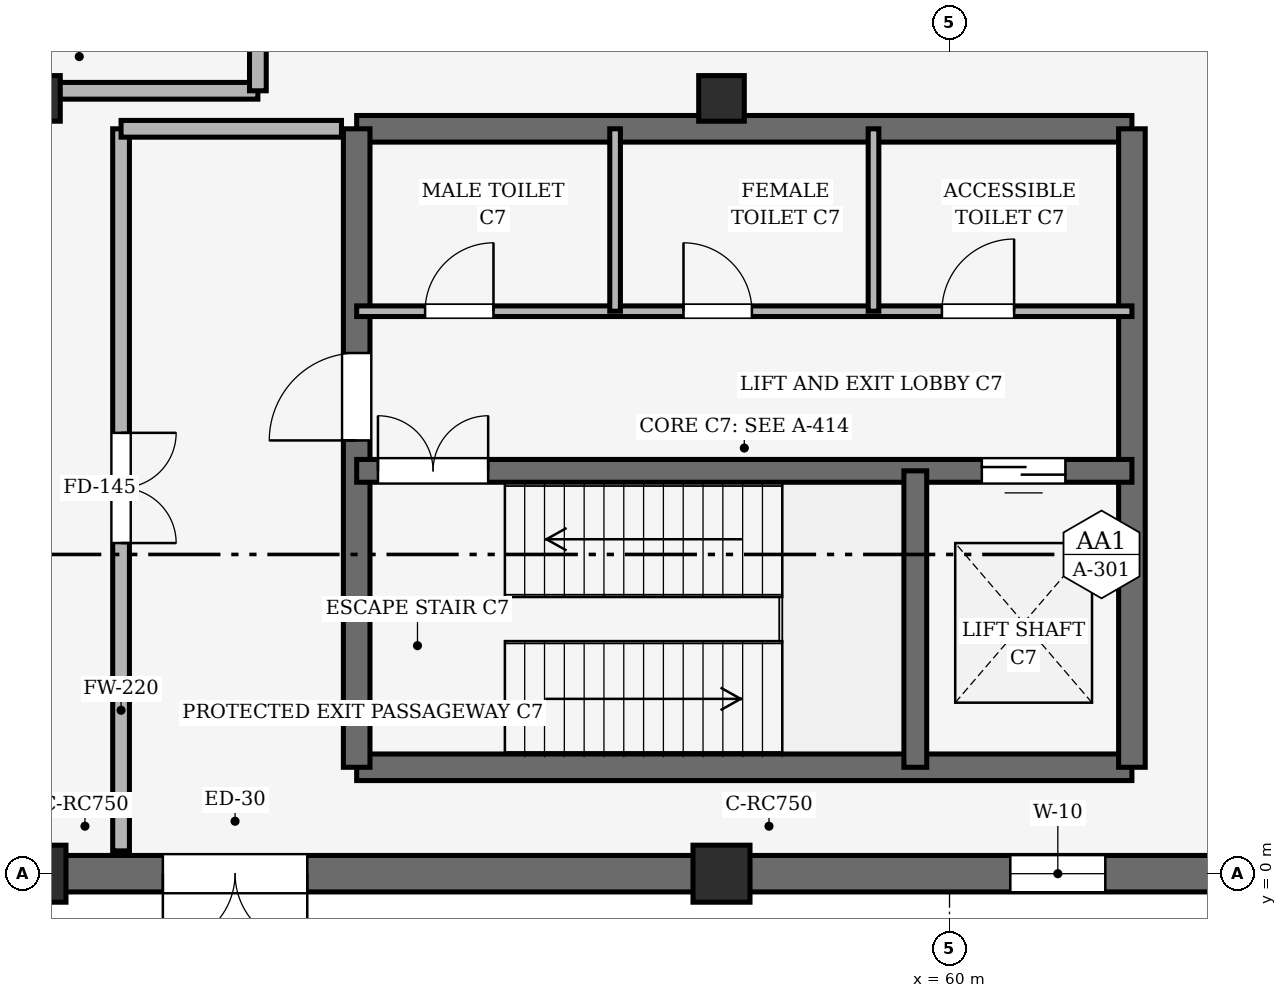
"""IFC4 building model, lengths in metres.
Left out: names, types, materials, properties, quantities, classifications, styles, units other than length and angle.
Written with IfcOpenShell. Run it as: python <this file> out.ifc"""

import sys

from ifc_helpers import new_model, si_unit, direction, frame, frame_2d, origin, origin_2d, place, context, subcontext, project, spatial, rectangle, extrude, element, fill, save


model = new_model("IFC4")
c1 = context("Model", 3, precision=1e-05, world=origin(), true_north=direction((0.0, 1.0)))
c2 = subcontext(c1, "Body", "Model", "MODEL_VIEW")
j1 = project(units=[si_unit("LENGTHUNIT", "METRE"), si_unit("PLANEANGLEUNIT", "RADIAN")], contexts=[c1])
p1 = place(None, origin())
s1 = spatial("IfcSite", under=j1, at=p1, CompositionType="ELEMENT")
p2 = place(p1, origin())
s2 = spatial("IfcBuilding", under=s1, at=p2, CompositionType="ELEMENT")
p3 = place(p2, origin())
s3 = spatial("IfcBuildingStorey", under=s2, at=p3, CompositionType="ELEMENT", Elevation=0.0)
p4 = place(p3, frame((48.0, 0.0, -0.44), z_axis=(0.0, 0.0, 1.0), x_axis=(1.0, 0.0, 0.0)))
e1 = element("IfcColumn", 1, at=p4, inside=s3, PredefinedType="COLUMN", context=c2, shape_type="SweptSolid", body=[
    extrude(rectangle(XDim=0.75, YDim=0.75, at=origin_2d()), origin(), (0.0, 0.0, 1.0), 5.84),
])
p5 = place(p3, frame((48.0, 10.2, -0.44), z_axis=(0.0, 0.0, 1.0), x_axis=(1.0, 0.0, 0.0)))
e2 = element("IfcColumn", 2, at=p5, inside=s3, PredefinedType="COLUMN", context=c2, shape_type="SweptSolid", body=[
    extrude(rectangle(XDim=0.6, YDim=0.6, at=origin_2d()), origin(), (0.0, 0.0, 1.0), 5.84),
])
p6 = place(p3, frame((57.0, 0.0, -0.44), z_axis=(0.0, 0.0, 1.0), x_axis=(1.0, 0.0, 0.0)))
e3 = element("IfcColumn", 3, at=p6, inside=s3, PredefinedType="COLUMN", context=c2, shape_type="SweptSolid", body=[
    extrude(rectangle(XDim=0.75, YDim=0.75, at=origin_2d()), origin(), (0.0, 0.0, 1.0), 5.84),
])
p7 = place(p3, frame((57.0, 10.2, -0.44), z_axis=(0.0, 0.0, 1.0), x_axis=(1.0, 0.0, 0.0)))
e4 = element("IfcColumn", 4, at=p7, inside=s3, PredefinedType="COLUMN", context=c2, shape_type="SweptSolid", body=[
    extrude(rectangle(XDim=0.6, YDim=0.6, at=origin_2d()), origin(), (0.0, 0.0, 1.0), 5.84),
])
p8 = place(p3, frame((48.0, 0.0, 0.0), z_axis=(0.0, 0.0, 1.0), x_axis=(1.0, 0.0, 0.0)))
e5 = element("IfcWall", 5, at=p8, inside=s3, PredefinedType="SOLIDWALL", context=c2, shape_type="SweptSolid", body=[
    extrude(rectangle(XDim=9.0, YDim=0.48, at=frame_2d((4.5, 0.0))), origin(), (0.0, 0.0, 1.0), 4.65),
])
p9 = place(p8, frame((1.65, 0.0, 0.0)))
e6 = element("IfcOpeningElement", 6, at=p9, cuts=e5, PredefinedType="OPENING", context=c2, shape_type="SweptSolid", body=[
    extrude(rectangle(XDim=1.9, YDim=2.35, at=frame_2d((0.95, 1.175))), frame((0.0, 0.25, 0.0), z_axis=(0.0, -1.0, 0.0), x_axis=(1.0, 0.0, 0.0)), (0.0, 0.0, 1.0), 0.5),
])
p10 = place(p3, frame((57.0, 0.0, 0.0), z_axis=(0.0, 0.0, 1.0), x_axis=(1.0, 0.0, 0.0)))
e7 = element("IfcWall", 7, at=p10, inside=s3, PredefinedType="SOLIDWALL", context=c2, shape_type="SweptSolid", body=[
    extrude(rectangle(XDim=9.0, YDim=0.48, at=frame_2d((4.5, 0.0))), origin(), (0.0, 0.0, 1.0), 4.65),
])
p11 = place(p10, frame((3.8, 0.0, 1.3)))
e8 = element("IfcOpeningElement", 8, at=p11, cuts=e7, PredefinedType="OPENING", context=c2, shape_type="SweptSolid", body=[
    extrude(rectangle(XDim=1.25, YDim=1.85, at=frame_2d((0.625, 0.925))), frame((0.0, 0.25, 0.0), z_axis=(0.0, -1.0, 0.0), x_axis=(1.0, 0.0, 0.0)), (0.0, 0.0, 1.0), 0.5),
])
for number, where, z_axis, x_axis in (
    (9, (52.2, 1.4, 0.0), (0.0, 0.0, 1.0), (1.0, 0.0, 0.0)),
    (10, (62.4, 9.8, 0.0), (0.0, 0.0, 1.0), (-1.0, 0.0, 0.0)),
):
    element("IfcWall", number, at=place(p3, frame(where, z_axis=z_axis, x_axis=x_axis)), inside=s3, PredefinedType="SHEAR", context=c2, shape_type="SweptSolid", body=[
        extrude(rectangle(XDim=10.2, YDim=0.35, at=frame_2d((5.1, 0.0))), origin(), (0.0, 0.0, 1.0), 5.4),
    ])
p12 = place(p3, frame((52.2, 9.8, 0.0), z_axis=(0.0, 0.0, 1.0), x_axis=(0.0, -1.0, 0.0)))
e11 = element("IfcWall", 11, at=p12, inside=s3, PredefinedType="SHEAR", context=c2, shape_type="SweptSolid", body=[
    extrude(rectangle(XDim=8.4, YDim=0.35, at=frame_2d((4.2, 0.0))), origin(), (0.0, 0.0, 1.0), 5.4),
])
p13 = place(p12, frame((2.95, 0.0, 0.0)))
e12 = element("IfcOpeningElement", 12, at=p13, cuts=e11, PredefinedType="OPENING", context=c2, shape_type="SweptSolid", body=[
    extrude(rectangle(XDim=1.15, YDim=2.15, at=frame_2d((0.575, 1.075))), frame((0.0, 0.185, 0.0), z_axis=(0.0, -1.0, 0.0), x_axis=(1.0, 0.0, 0.0)), (0.0, 0.0, 1.0), 0.37),
])
p14 = place(p3, frame((62.4, 1.4, 0.0), z_axis=(0.0, 0.0, 1.0), x_axis=(0.0, 1.0, 0.0)))
e13 = element("IfcWall", 13, at=p14, inside=s3, PredefinedType="SHEAR", context=c2, shape_type="SweptSolid", body=[
    extrude(rectangle(XDim=8.4, YDim=0.35, at=frame_2d((4.2, 0.0))), origin(), (0.0, 0.0, 1.0), 5.4),
])
p15 = place(p3, frame((52.2, 5.3, 0.0), z_axis=(0.0, 0.0, 1.0), x_axis=(1.0, 0.0, 0.0)))
e14 = element("IfcWall", 14, at=p15, inside=s3, PredefinedType="SHEAR", context=c2, shape_type="SweptSolid", body=[
    extrude(rectangle(XDim=10.2, YDim=0.3, at=frame_2d((5.1, 0.0))), origin(), (0.0, 0.0, 1.0), 5.4),
])
p16 = place(p15, frame((0.28, 0.0, 0.0)))
e15 = element("IfcOpeningElement", 15, at=p16, cuts=e14, PredefinedType="OPENING", context=c2, shape_type="SweptSolid", body=[
    extrude(rectangle(XDim=1.45, YDim=2.15, at=frame_2d((0.725, 1.075))), frame((0.0, 0.16, 0.0), z_axis=(0.0, -1.0, 0.0), x_axis=(1.0, 0.0, 0.0)), (0.0, 0.0, 1.0), 0.32),
])
p17 = place(p15, frame((8.225, 0.0, 0.0)))
e16 = element("IfcOpeningElement", 16, at=p17, cuts=e14, PredefinedType="OPENING", context=c2, shape_type="SweptSolid", body=[
    extrude(rectangle(XDim=1.1, YDim=2.15, at=frame_2d((0.55, 1.075))), frame((0.0, 0.16, 0.0), z_axis=(0.0, -1.0, 0.0), x_axis=(1.0, 0.0, 0.0)), (0.0, 0.0, 1.0), 0.32),
])
p18 = place(p3, frame((59.55, 1.4, 0.0), z_axis=(0.0, 0.0, 1.0), x_axis=(0.0, 1.0, 0.0)))
e17 = element("IfcWall", 17, at=p18, inside=s3, PredefinedType="SHEAR", context=c2, shape_type="SweptSolid", body=[
    extrude(rectangle(XDim=3.9, YDim=0.3, at=frame_2d((1.95, 0.0))), origin(), (0.0, 0.0, 1.0), 5.4),
])
p19 = place(p3, frame((52.2, 7.4, 0.0), z_axis=(0.0, 0.0, 1.0), x_axis=(1.0, 0.0, 0.0)))
e18 = element("IfcWall", 18, at=p19, inside=s3, PredefinedType="PARTITIONING", context=c2, shape_type="SweptSolid", body=[
    extrude(rectangle(XDim=10.2, YDim=0.14, at=frame_2d((5.1, 0.0))), origin(), (0.0, 0.0, 1.0), 4.5),
])
p20 = place(p19, frame((0.9, 0.0, 0.0)))
e19 = element("IfcOpeningElement", 19, at=p20, cuts=e18, PredefinedType="OPENING", context=c2, shape_type="SweptSolid", body=[
    extrude(rectangle(XDim=0.9, YDim=2.1, at=frame_2d((0.45, 1.05))), frame((0.0, 0.08, 0.0), z_axis=(0.0, -1.0, 0.0), x_axis=(1.0, 0.0, 0.0)), (0.0, 0.0, 1.0), 0.16),
])
p21 = place(p19, frame((4.3, 0.0, 0.0)))
e20 = element("IfcOpeningElement", 20, at=p21, cuts=e18, PredefinedType="OPENING", context=c2, shape_type="SweptSolid", body=[
    extrude(rectangle(XDim=0.9, YDim=2.1, at=frame_2d((0.45, 1.05))), frame((0.0, 0.08, 0.0), z_axis=(0.0, -1.0, 0.0), x_axis=(1.0, 0.0, 0.0)), (0.0, 0.0, 1.0), 0.16),
])
p22 = place(p19, frame((7.7, 0.0, 0.0)))
e21 = element("IfcOpeningElement", 21, at=p22, cuts=e18, PredefinedType="OPENING", context=c2, shape_type="SweptSolid", body=[
    extrude(rectangle(XDim=0.95, YDim=2.1, at=frame_2d((0.475, 1.05))), frame((0.0, 0.08, 0.0), z_axis=(0.0, -1.0, 0.0), x_axis=(1.0, 0.0, 0.0)), (0.0, 0.0, 1.0), 0.16),
])
for number, where, z_axis, x_axis in (
    (22, (55.6, 7.4, 0.0), (0.0, 0.0, 1.0), (0.0, 1.0, 0.0)),
    (23, (59.0, 7.4, 0.0), (0.0, 0.0, 1.0), (0.0, 1.0, 0.0)),
):
    element("IfcWall", number, at=place(p3, frame(where, z_axis=z_axis, x_axis=x_axis)), inside=s3, PredefinedType="PARTITIONING", context=c2, shape_type="SweptSolid", body=[
        extrude(rectangle(XDim=2.4, YDim=0.14, at=frame_2d((1.2, 0.0))), origin(), (0.0, 0.0, 1.0), 4.5),
    ])
p23 = place(p3, frame((49.1, 9.8, 0.0), z_axis=(0.0, 0.0, 1.0), x_axis=(0.0, -1.0, 0.0)))
e24 = element("IfcWall", 24, at=p23, inside=s3, PredefinedType="SOLIDWALL", context=c2, shape_type="SweptSolid", body=[
    extrude(rectangle(XDim=9.5, YDim=0.22, at=frame_2d((4.75, 0.0))), origin(), (0.0, 0.0, 1.0), 4.6),
])
p24 = place(p23, frame((4.0, 0.0, 0.0)))
e25 = element("IfcOpeningElement", 25, at=p24, cuts=e24, PredefinedType="OPENING", context=c2, shape_type="SweptSolid", body=[
    extrude(rectangle(XDim=1.45, YDim=2.15, at=frame_2d((0.725, 1.075))), frame((0.0, 0.12, 0.0), z_axis=(0.0, -1.0, 0.0), x_axis=(1.0, 0.0, 0.0)), (0.0, 0.0, 1.0), 0.24),
])
p25 = place(p3, frame((49.1, 9.8, 0.0), z_axis=(0.0, 0.0, 1.0), x_axis=(1.0, 0.0, 0.0)))
e26 = element("IfcWall", 26, at=p25, inside=s3, PredefinedType="SOLIDWALL", context=c2, shape_type="SweptSolid", body=[
    extrude(rectangle(XDim=2.9, YDim=0.22, at=frame_2d((1.45, 0.0))), origin(), (0.0, 0.0, 1.0), 4.6),
])
p26 = place(p3, frame((15.1, 10.3, 0.0), z_axis=(0.0, 0.0, 1.0), x_axis=(1.0, 0.0, 0.0)))
e27 = element("IfcWall", 27, at=p26, inside=s3, PredefinedType="SOLIDWALL", context=c2, shape_type="SweptSolid", body=[
    extrude(rectangle(XDim=35.8, YDim=0.22, at=frame_2d((17.9, 0.0))), origin(), (0.0, 0.0, 1.0), 4.1),
])
p27 = place(p26, frame((9.4, 0.0, 0.0)))
e28 = element("IfcOpeningElement", 28, at=p27, cuts=e27, PredefinedType="OPENING", context=c2, shape_type="SweptSolid", body=[
    extrude(rectangle(XDim=2.05, YDim=2.3, at=frame_2d((1.025, 1.15))), frame((0.0, 0.12, 0.0), z_axis=(0.0, -1.0, 0.0), x_axis=(1.0, 0.0, 0.0)), (0.0, 0.0, 1.0), 0.24),
])
p28 = place(p26, frame((27.4, 0.0, 0.0)))
e29 = element("IfcOpeningElement", 29, at=p28, cuts=e27, PredefinedType="OPENING", context=c2, shape_type="SweptSolid", body=[
    extrude(rectangle(XDim=2.05, YDim=2.3, at=frame_2d((1.025, 1.15))), frame((0.0, 0.12, 0.0), z_axis=(0.0, -1.0, 0.0), x_axis=(1.0, 0.0, 0.0)), (0.0, 0.0, 1.0), 0.24),
])
p29 = place(p3, frame((50.9, 10.3, 0.0), z_axis=(0.0, 0.0, 1.0), x_axis=(0.0, 1.0, 0.0)))
e30 = element("IfcWall", 30, at=p29, inside=s3, PredefinedType="SOLIDWALL", context=c2, shape_type="SweptSolid", body=[
    extrude(rectangle(XDim=23.4, YDim=0.22, at=frame_2d((11.7, 0.0))), origin(), (0.0, 0.0, 1.0), 4.1),
])
p30 = place(p29, frame((10.5, 0.0, 0.0)))
e31 = element("IfcOpeningElement", 31, at=p30, cuts=e30, PredefinedType="OPENING", context=c2, shape_type="SweptSolid", body=[
    extrude(rectangle(XDim=2.05, YDim=2.3, at=frame_2d((1.025, 1.15))), frame((0.0, 0.12, 0.0), z_axis=(0.0, -1.0, 0.0), x_axis=(1.0, 0.0, 0.0)), (0.0, 0.0, 1.0), 0.24),
])
p31 = place(p11, origin())
e32 = element("IfcWindow", 32, at=p31, inside=s3, PartitioningType="SINGLE_PANEL", PredefinedType="WINDOW", context=c2, shape_type="SweptSolid", body=[
    extrude(rectangle(XDim=1.25, YDim=1.85, at=frame_2d((0.625, 0.925))), frame((0.0, 0.03, 0.0), z_axis=(0.0, -1.0, 0.0), x_axis=(1.0, 0.0, 0.0)), (0.0, 0.0, 1.0), 0.06),
])
fill(e8, e32)
p32 = place(p9, frame((1.9, 0.0, 0.0), z_axis=(0.0, 0.0, 1.0), x_axis=(-1.0, 0.0, 0.0)))
e33 = element("IfcDoor", 33, at=p32, inside=s3, OperationType="DOUBLE_DOOR_SINGLE_SWING", PredefinedType="DOOR", context=c2, shape_type="SweptSolid", body=[
    extrude(rectangle(XDim=1.9, YDim=2.35, at=frame_2d((0.95, 1.175))), frame((0.0, 0.025, 0.0), z_axis=(0.0, -1.0, 0.0), x_axis=(1.0, 0.0, 0.0)), (0.0, 0.0, 1.0), 0.05),
])
fill(e6, e33)
p33 = place(p13, frame((1.15, 0.0, 0.0), z_axis=(0.0, 0.0, 1.0), x_axis=(-1.0, 0.0, 0.0)))
e34 = element("IfcDoor", 34, at=p33, inside=s3, OperationType="SINGLE_SWING_LEFT", PredefinedType="DOOR", context=c2, shape_type="SweptSolid", body=[
    extrude(rectangle(XDim=1.15, YDim=2.15, at=frame_2d((0.575, 1.075))), frame((0.0, 0.025, 0.0), z_axis=(0.0, -1.0, 0.0), x_axis=(1.0, 0.0, 0.0)), (0.0, 0.0, 1.0), 0.05),
])
fill(e12, e34)
p34 = place(p16, origin())
e35 = element("IfcDoor", 35, at=p34, inside=s3, OperationType="DOUBLE_DOOR_SINGLE_SWING", PredefinedType="DOOR", context=c2, shape_type="SweptSolid", body=[
    extrude(rectangle(XDim=1.45, YDim=2.15, at=frame_2d((0.725, 1.075))), frame((0.0, 0.025, 0.0), z_axis=(0.0, -1.0, 0.0), x_axis=(1.0, 0.0, 0.0)), (0.0, 0.0, 1.0), 0.05),
])
fill(e15, e35)
p35 = place(p17, origin())
e36 = element("IfcDoor", 36, at=p35, inside=s3, OperationType="DOUBLE_DOOR_SLIDING", PredefinedType="DOOR", context=c2, shape_type="SweptSolid", body=[
    extrude(rectangle(XDim=1.1, YDim=2.15, at=frame_2d((0.55, 1.075))), frame((0.0, 0.025, 0.0), z_axis=(0.0, -1.0, 0.0), x_axis=(1.0, 0.0, 0.0)), (0.0, 0.0, 1.0), 0.05),
])
fill(e16, e36)
p36 = place(p20, origin())
e37 = element("IfcDoor", 37, at=p36, inside=s3, OperationType="SINGLE_SWING_RIGHT", PredefinedType="DOOR", context=c2, shape_type="SweptSolid", body=[
    extrude(rectangle(XDim=0.9, YDim=2.1, at=frame_2d((0.45, 1.05))), frame((0.0, 0.025, 0.0), z_axis=(0.0, -1.0, 0.0), x_axis=(1.0, 0.0, 0.0)), (0.0, 0.0, 1.0), 0.05),
])
fill(e19, e37)
p37 = place(p21, origin())
e38 = element("IfcDoor", 38, at=p37, inside=s3, OperationType="SINGLE_SWING_LEFT", PredefinedType="DOOR", context=c2, shape_type="SweptSolid", body=[
    extrude(rectangle(XDim=0.9, YDim=2.1, at=frame_2d((0.45, 1.05))), frame((0.0, 0.025, 0.0), z_axis=(0.0, -1.0, 0.0), x_axis=(1.0, 0.0, 0.0)), (0.0, 0.0, 1.0), 0.05),
])
fill(e20, e38)
p38 = place(p22, origin())
e39 = element("IfcDoor", 39, at=p38, inside=s3, OperationType="SINGLE_SWING_RIGHT", PredefinedType="DOOR", context=c2, shape_type="SweptSolid", body=[
    extrude(rectangle(XDim=0.95, YDim=2.1, at=frame_2d((0.475, 1.05))), frame((0.0, 0.025, 0.0), z_axis=(0.0, -1.0, 0.0), x_axis=(1.0, 0.0, 0.0)), (0.0, 0.0, 1.0), 0.05),
])
fill(e21, e39)
p39 = place(p24, origin())
e40 = element("IfcDoor", 40, at=p39, inside=s3, OperationType="DOUBLE_DOOR_SINGLE_SWING", PredefinedType="DOOR", context=c2, shape_type="SweptSolid", body=[
    extrude(rectangle(XDim=1.45, YDim=2.15, at=frame_2d((0.725, 1.075))), frame((0.0, 0.025, 0.0), z_axis=(0.0, -1.0, 0.0), x_axis=(1.0, 0.0, 0.0)), (0.0, 0.0, 1.0), 0.05),
])
fill(e25, e40)
save(model, sys.argv[1])
